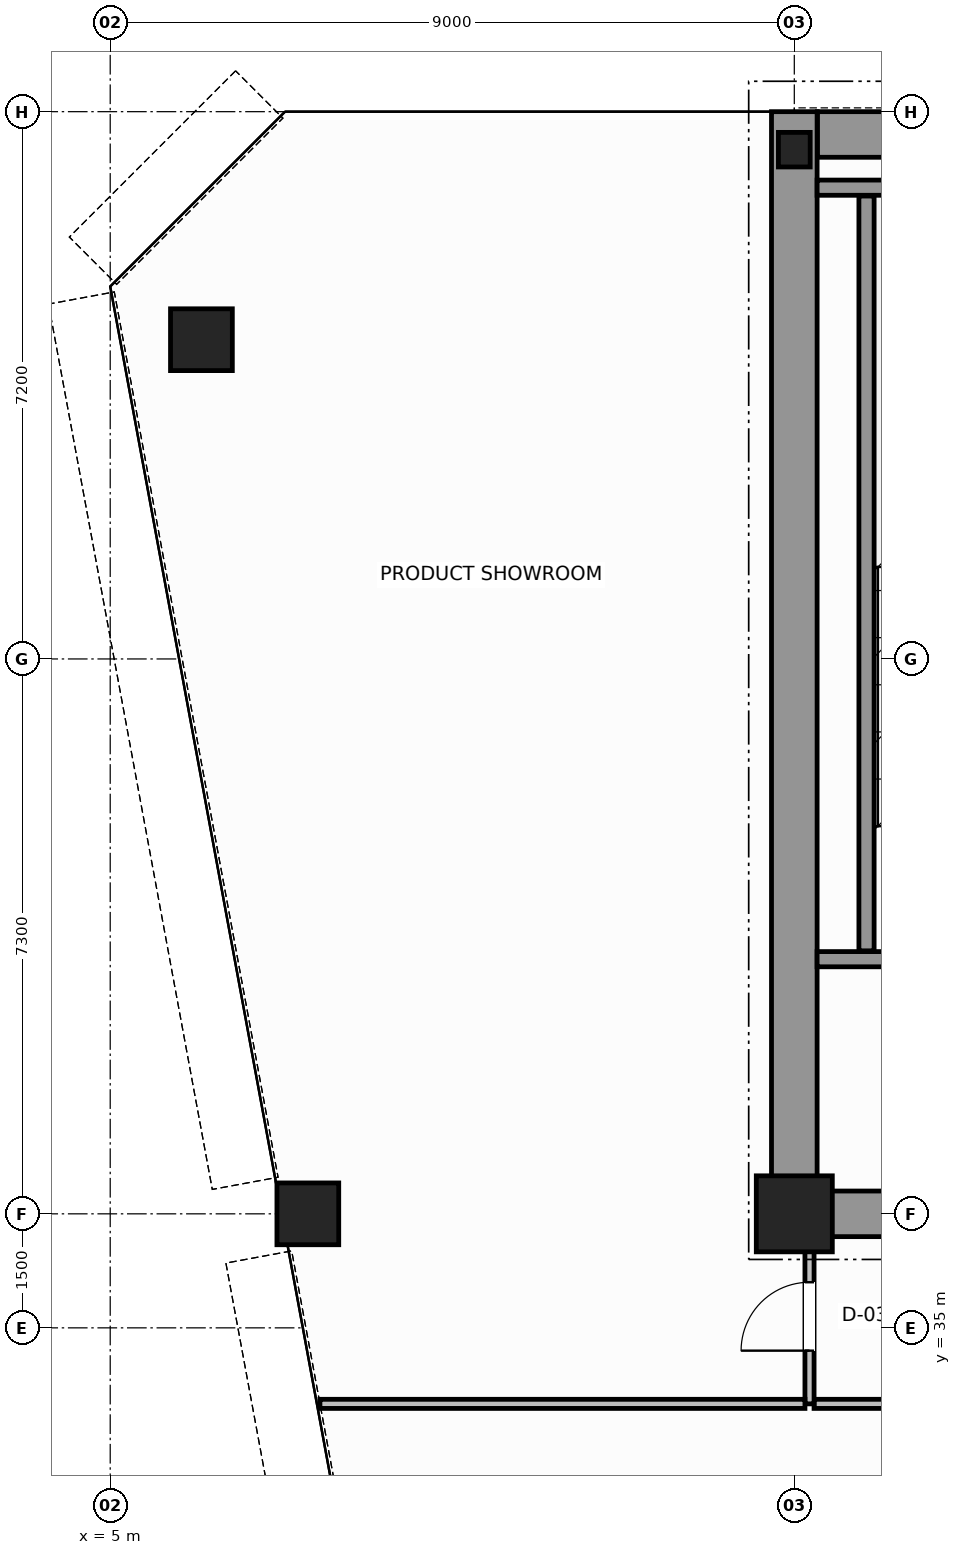
"""IFC4 building model, lengths in metres.
Left out: names, types, materials, properties, quantities, classifications, styles, units other than length and angle.
Written with IfcOpenShell. Run it as: python <this file> out.ifc"""

import sys

from ifc_helpers import new_model, si_unit, direction, frame, frame_2d, origin, origin_2d, place, context, subcontext, project, spatial, rectangle, hollow_circle, i_section, extrude, source, transform, mapped, element, fill, save


model = new_model("IFC4")
c1 = context("Model", 3, precision=1e-05, world=origin(), true_north=direction((0.0, 1.0)))
c2 = subcontext(c1, "Body", "Model", "MODEL_VIEW")
j1 = project(units=[si_unit("LENGTHUNIT", "METRE"), si_unit("PLANEANGLEUNIT", "RADIAN")], contexts=[c1])
p1 = place(None, origin())
s1 = spatial("IfcSite", under=j1, at=p1, CompositionType="ELEMENT")
p2 = place(p1, origin())
s2 = spatial("IfcBuilding", under=s1, at=p2, CompositionType="ELEMENT")
p3 = place(p2, frame((0.0, 0.0, 223.2)))
s3 = spatial("IfcBuildingStorey", under=s2, at=p3, CompositionType="ELEMENT", Elevation=223.2)
m1 = source(origin(), c2, "Body", "SweptSolid", [
    extrude(rectangle(XDim=1.0, YDim=1.0, at=origin_2d()), origin(), (0.0, 0.0, 1.0), 3.8),
])
p4 = place(p3, frame((14.0, 36.5, 0.0), z_axis=(0.0, 0.0, 1.0), x_axis=(1.0, 0.0, 0.0)))
e1 = element("IfcColumn", 1, at=p4, inside=s3, PredefinedType="COLUMN", context=c2, shape_type="MappedRepresentation", body=[
    mapped(m1, transform((0.0, 0.0, 0.0), scale=1.0)),
])
m2 = source(origin(), c2, "Body", "SweptSolid", [
    extrude(i_section(OverallWidth=0.418, OverallDepth=0.455, WebThickness=0.042, FlangeThickness=0.058, FilletRadius=0.015, at=origin_2d()), origin(), (0.0, 0.0, 1.0), 3.8),
])
p5 = place(p3, frame((14.0, 50.5, 0.0), z_axis=(0.0, 0.0, 1.0), x_axis=(1.0, 0.0, 0.0)))
e2 = element("IfcColumn", 2, at=p5, inside=s3, PredefinedType="COLUMN", context=c2, shape_type="MappedRepresentation", body=[
    mapped(m2, transform((0.0, 0.0, 0.0), scale=1.0)),
])
m3 = source(origin(), c2, "Body", "SweptSolid", [
    extrude(hollow_circle(Radius=0.406, WallThickness=0.04, at=origin_2d()), origin(), (0.0, 0.0, 1.0), 3.8),
])
for number, where, z_axis, x_axis in (
    (3, (6.2, 48.0, 0.0), (0.0, 0.0, 1.0), (1.0, 0.0, 0.0)),
    (4, (7.6, 36.5, 0.0), (0.0, 0.0, 1.0), (1.0, 0.0, 0.0)),
):
    element("IfcColumn", number, at=place(p3, frame(where, z_axis=z_axis, x_axis=x_axis)), inside=s3, PredefinedType="COLUMN", context=c2, shape_type="MappedRepresentation", body=[
        mapped(m3, transform((0.0, 0.0, 0.0), scale=1.0)),
    ])
p6 = place(p3, frame((14.304, 50.7, 0.0), z_axis=(0.0, 0.0, 1.0), x_axis=(1.0, 0.0, 0.0)))
e5 = element("IfcWall", 5, at=p6, inside=s3, PredefinedType="SHEAR", context=c2, shape_type="SweptSolid", body=[
    extrude(rectangle(XDim=19.694, YDim=0.6, at=frame_2d((9.847, 0.0))), origin(), (0.0, 0.0, 1.0), 3.8),
])
p7 = place(p3, frame((14.0, 36.5, 0.0), z_axis=(0.0, 0.0, 1.0), x_axis=(0.0, 1.0, 0.0)))
e6 = element("IfcWall", 6, at=p7, inside=s3, PredefinedType="SHEAR", context=c2, shape_type="SweptSolid", body=[
    extrude(rectangle(XDim=14.5, YDim=0.6, at=frame_2d((7.25, 0.0))), origin(), (0.0, 0.0, 1.0), 3.8),
])
p8 = place(p3, frame((14.32, 36.5, 0.0), z_axis=(0.0, 0.0, 1.0), x_axis=(1.0, 0.0, 0.0)))
e7 = element("IfcWall", 7, at=p8, inside=s3, PredefinedType="SHEAR", context=c2, shape_type="SweptSolid", body=[
    extrude(rectangle(XDim=3.88, YDim=0.6, at=frame_2d((1.94, 0.0))), origin(), (0.0, 0.0, 1.0), 2.58),
])
p9 = place(p3, frame((14.3, 39.85, 0.0), z_axis=(0.0, 0.0, 1.0), x_axis=(1.0, 0.0, 0.0)))
e8 = element("IfcWall", 8, at=p9, inside=s3, PredefinedType="SOLIDWALL", context=c2, shape_type="SweptSolid", body=[
    extrude(rectangle(XDim=4.3, YDim=0.2, at=frame_2d((2.15, 0.0))), origin(), (0.0, 0.0, 1.0), 3.8),
])
p10 = place(p9, frame((1.875, 0.0, 0.0)))
e9 = element("IfcOpeningElement", 9, at=p10, cuts=e8, PredefinedType="OPENING", context=c2, shape_type="SweptSolid", body=[
    extrude(rectangle(XDim=1.1, YDim=2.15, at=frame_2d((0.55, 1.075))), frame((0.0, 0.11, 0.0), z_axis=(0.0, -1.0, 0.0), x_axis=(1.0, 0.0, 0.0)), (0.0, 0.0, 1.0), 0.22),
])
p11 = place(p3, frame((14.3, 50.0, 0.0), z_axis=(0.0, 0.0, 1.0), x_axis=(1.0, 0.0, 0.0)))
e10 = element("IfcWall", 10, at=p11, inside=s3, PredefinedType="SOLIDWALL", context=c2, shape_type="SweptSolid", body=[
    extrude(rectangle(XDim=4.3, YDim=0.2, at=frame_2d((2.15, 0.0))), origin(), (0.0, 0.0, 1.0), 3.8),
])
p12 = place(p3, frame((14.95, 39.96, 0.0), z_axis=(0.0, 0.0, 1.0), x_axis=(0.0, 1.0, 0.0)))
e11 = element("IfcWall", 11, at=p12, inside=s3, PredefinedType="SOLIDWALL", context=c2, shape_type="SweptSolid", body=[
    extrude(rectangle(XDim=9.93, YDim=0.2, at=frame_2d((4.965, 0.0))), origin(), (0.0, 0.0, 1.0), 3.8),
])
p13 = place(p3, frame((14.26, 34.0, 0.0), z_axis=(0.0, 0.0, 1.0), x_axis=(1.0, 0.0, 0.0)))
e12 = element("IfcWall", 12, at=p13, inside=s3, PredefinedType="PARTITIONING", context=c2, shape_type="SweptSolid", body=[
    extrude(rectangle(XDim=19.48, YDim=0.12, at=frame_2d((9.74, 0.0))), origin(), (0.0, 0.0, 1.0), 3.58),
])
p14 = place(p3, frame((14.2, 34.0, 0.0), z_axis=(0.0, 0.0, 1.0), x_axis=(0.0, 1.0, 0.0)))
e13 = element("IfcWall", 13, at=p14, inside=s3, PredefinedType="PARTITIONING", context=c2, shape_type="SweptSolid", body=[
    extrude(rectangle(XDim=2.44, YDim=0.12, at=frame_2d((1.22, 0.0))), origin(), (0.0, 0.0, 1.0), 3.58),
])
p15 = place(p14, frame((0.7, 0.0, 0.0)))
e14 = element("IfcOpeningElement", 14, at=p15, cuts=e13, PredefinedType="OPENING", context=c2, shape_type="SweptSolid", body=[
    extrude(rectangle(XDim=0.9, YDim=2.15, at=frame_2d((0.45, 1.075))), frame((0.0, 0.07, 0.0), z_axis=(0.0, -1.0, 0.0), x_axis=(1.0, 0.0, 0.0)), (0.0, 0.0, 1.0), 0.14),
])
p16 = place(p3, frame((7.759, 34.0, 0.0), z_axis=(0.0, 0.0, 1.0), x_axis=(1.0, 0.0, 0.0)))
e15 = element("IfcWall", 15, at=p16, inside=s3, PredefinedType="PARTITIONING", context=c2, shape_type="SweptSolid", body=[
    extrude(rectangle(XDim=6.381, YDim=0.12, at=frame_2d((3.19, 0.0))), origin(), (0.0, 0.0, 1.0), 3.58),
])
m4 = source(origin(), c2, "Body", "SweptSolid", [
    extrude(rectangle(XDim=0.9, YDim=2.15, at=frame_2d((0.45, 1.075))), frame((0.0, 0.025, 0.0), z_axis=(0.0, -1.0, 0.0), x_axis=(1.0, 0.0, 0.0)), (0.0, 0.0, 1.0), 0.05),
])
p17 = place(p15, origin())
e16 = element("IfcDoor", 16, at=p17, inside=s3, OperationType="SINGLE_SWING_LEFT", PredefinedType="DOOR", context=c2, shape_type="MappedRepresentation", body=[
    mapped(m4, transform((0.0, 0.0, 0.0), scale=1.0)),
])
fill(e14, e16)
save(model, sys.argv[1])
